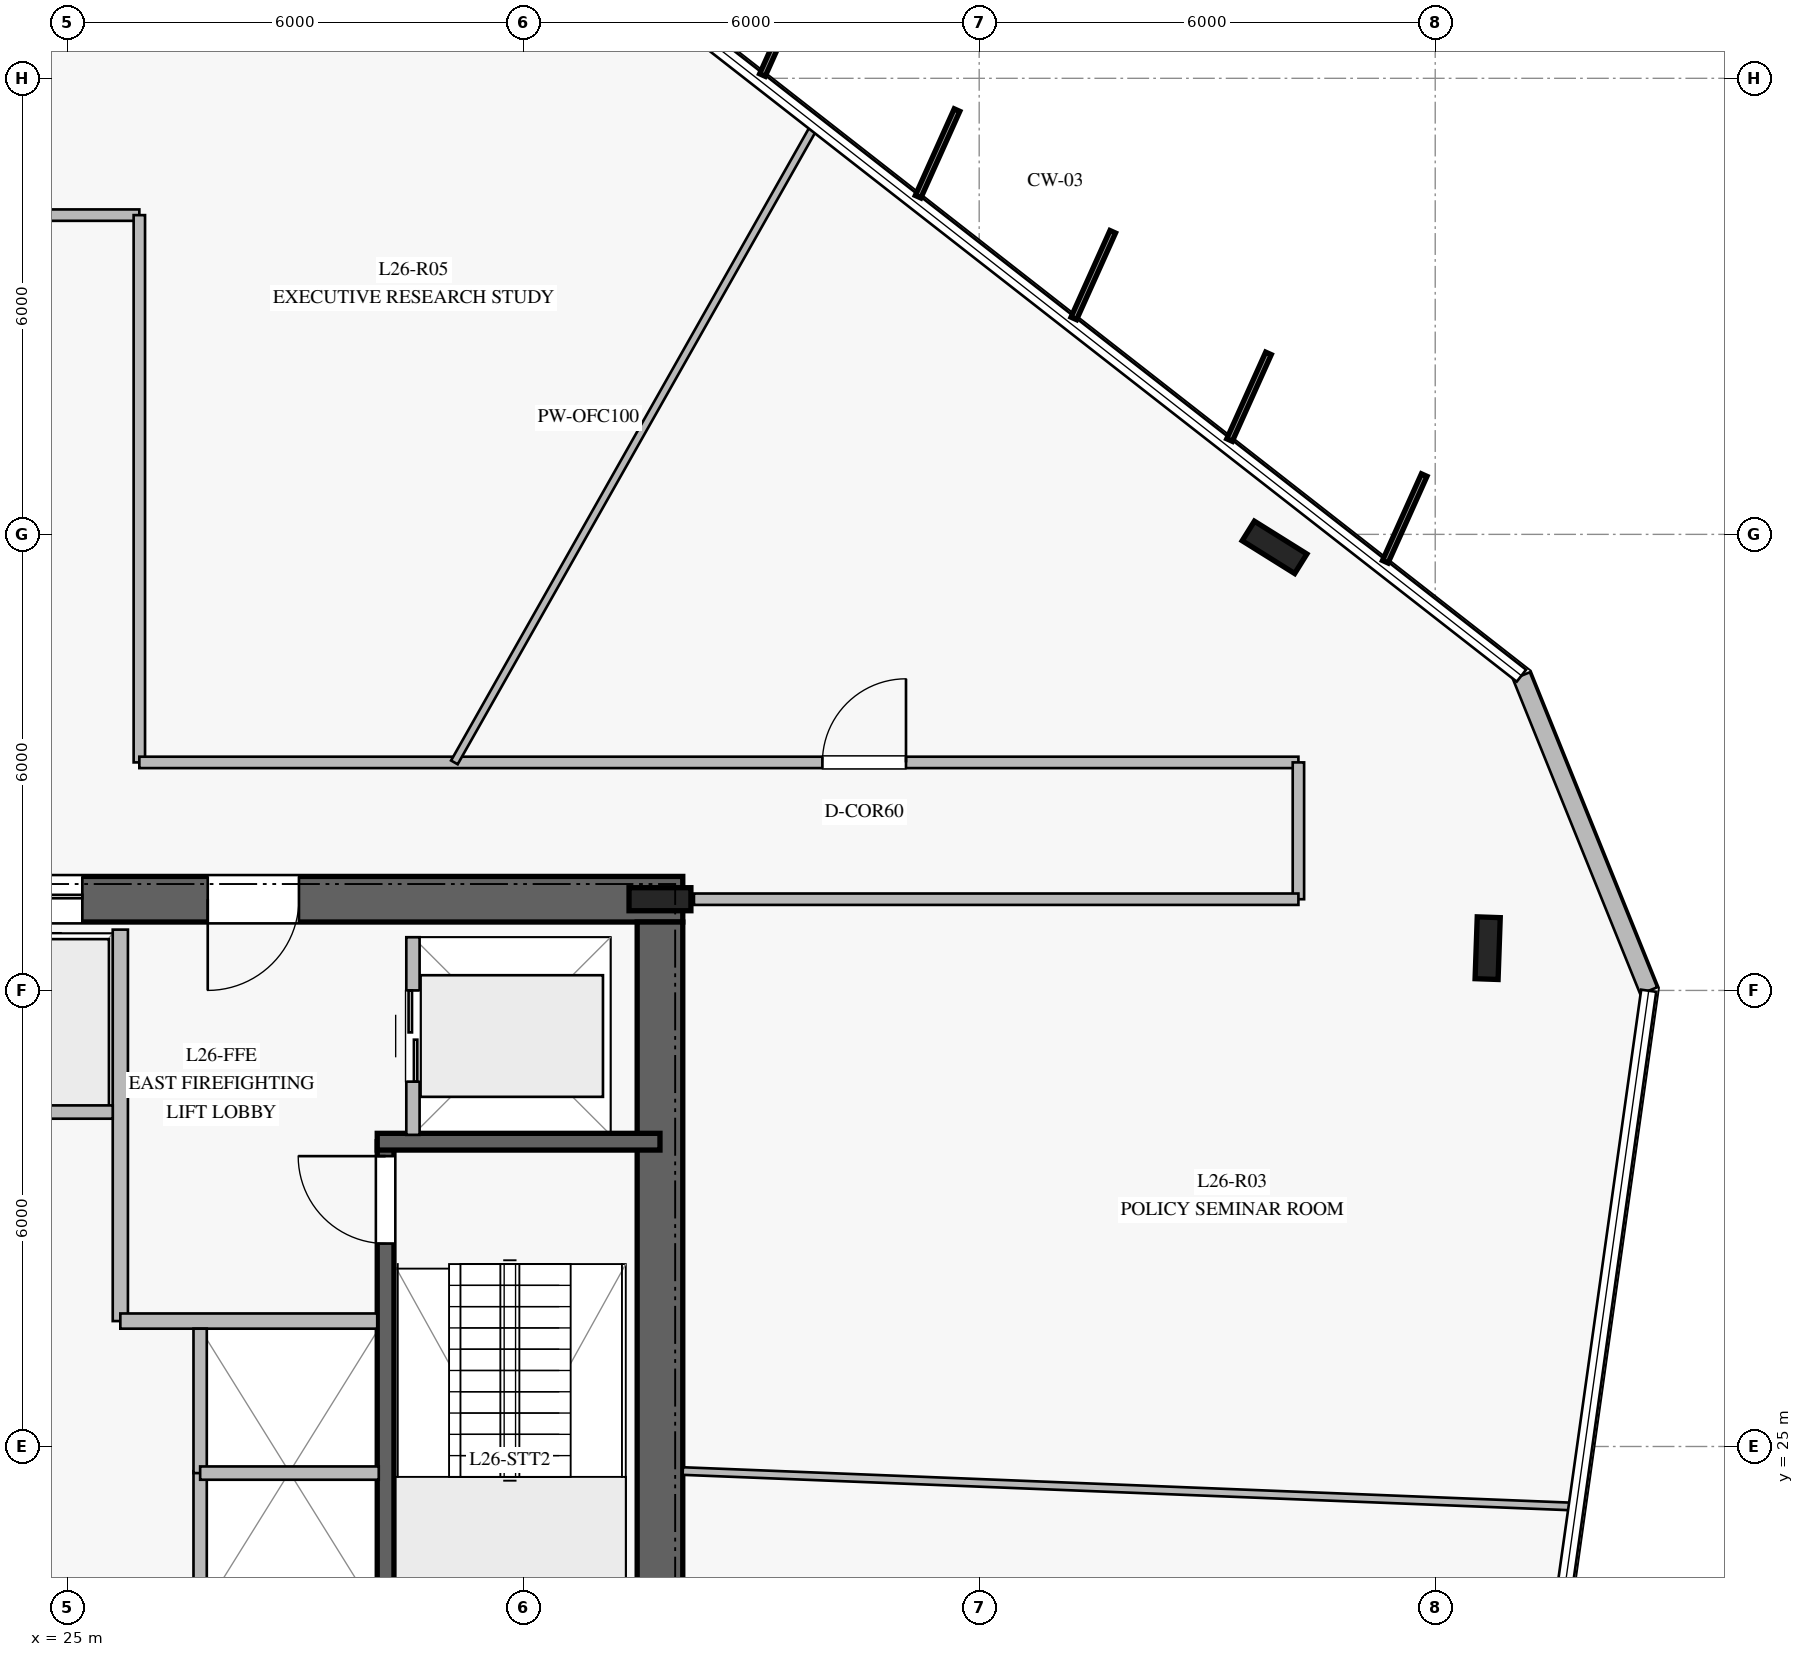
"""IFC4 building model, lengths in metres.
Left out: names, types, materials, properties, quantities, classifications, styles, units other than length and angle.
Written with IfcOpenShell. Run it as: python <this file> out.ifc"""

import sys

from ifc_helpers import new_model, si_unit, direction, frame, frame_2d, origin, origin_2d, place, context, subcontext, project, spatial, rectangle, i_section, extrude, element, fill, save


model = new_model("IFC4")
c1 = context("Model", 3, precision=1e-05, world=origin(), true_north=direction((0.0, 1.0)))
c2 = subcontext(c1, "Body", "Model", "MODEL_VIEW")
j1 = project(units=[si_unit("LENGTHUNIT", "METRE"), si_unit("PLANEANGLEUNIT", "RADIAN")], contexts=[c1])
p1 = place(None, origin())
s1 = spatial("IfcSite", under=j1, at=p1, CompositionType="ELEMENT")
p2 = place(p1, origin())
s2 = spatial("IfcBuilding", under=s1, at=p2, CompositionType="ELEMENT")
p3 = place(p2, frame((0.0, 0.0, 110.4)))
s3 = spatial("IfcBuildingStorey", under=s2, at=p3, CompositionType="ELEMENT", Elevation=110.4)
p4 = place(p3, frame((33.1, 32.2, 0.0), z_axis=(0.0, 0.0, 1.0), x_axis=(-1.0, 0.0, 0.0)))
e1 = element("IfcWall", 1, at=p4, inside=s3, PredefinedType="SHEAR", context=c2, shape_type="SweptSolid", body=[
    extrude(rectangle(XDim=16.2, YDim=0.6, at=frame_2d((8.1, 0.0))), origin(), (0.0, 0.0, 1.0), 3.76),
])
p5 = place(p4, frame((5.05, 0.0, 0.0)))
e2 = element("IfcOpeningElement", 2, at=p5, cuts=e1, PredefinedType="OPENING", context=c2, shape_type="SweptSolid", body=[
    extrude(rectangle(XDim=1.2, YDim=2.25, at=frame_2d((0.6, 1.125))), frame((0.0, 0.31, 0.0), z_axis=(0.0, -1.0, 0.0), x_axis=(1.0, 0.0, 0.0)), (0.0, 0.0, 1.0), 0.62),
])
p6 = place(p4, frame((11.85, 0.0, 0.0)))
e3 = element("IfcOpeningElement", 3, at=p6, cuts=e1, PredefinedType="OPENING", context=c2, shape_type="SweptSolid", body=[
    extrude(rectangle(XDim=1.1, YDim=2.2, at=frame_2d((0.55, 1.1))), frame((0.0, 0.31, 0.0), z_axis=(0.0, -1.0, 0.0), x_axis=(1.0, 0.0, 0.0)), (0.0, 0.0, 1.0), 0.62),
])
p7 = place(p4, frame((9.875, 0.0, 0.0)))
e4 = element("IfcOpeningElement", 4, at=p7, cuts=e1, PredefinedType="OPENING", context=c2, shape_type="SweptSolid", body=[
    extrude(rectangle(XDim=1.1, YDim=2.2, at=frame_2d((0.55, 1.1))), frame((0.0, 0.31, 0.0), z_axis=(0.0, -1.0, 0.0), x_axis=(1.0, 0.0, 0.0)), (0.0, 0.0, 1.0), 0.62),
])
p8 = place(p4, frame((7.9, 0.0, 0.0)))
e5 = element("IfcOpeningElement", 5, at=p8, cuts=e1, PredefinedType="OPENING", context=c2, shape_type="SweptSolid", body=[
    extrude(rectangle(XDim=1.1, YDim=2.2, at=frame_2d((0.55, 1.1))), frame((0.0, 0.31, 0.0), z_axis=(0.0, -1.0, 0.0), x_axis=(1.0, 0.0, 0.0)), (0.0, 0.0, 1.0), 0.62),
])
p9 = place(p3, frame((32.8, 18.1, 0.0), z_axis=(0.0, 0.0, 1.0), x_axis=(0.0, 1.0, 0.0)))
e6 = element("IfcWall", 6, at=p9, inside=s3, PredefinedType="SHEAR", context=c2, shape_type="SweptSolid", body=[
    extrude(rectangle(XDim=13.8, YDim=0.6, at=frame_2d((6.9, 0.0))), origin(), (0.0, 0.0, 1.0), 3.76),
])
p10 = place(p3, frame((32.8, 32.2, 0.0), z_axis=(0.0, 0.0, 1.0), x_axis=(1.0, 0.0, 0.0)))
e7 = element("IfcColumn", 7, at=p10, inside=s3, PredefinedType="COLUMN", context=c2, shape_type="SweptSolid", body=[
    extrude(i_section(OverallWidth=0.303, OverallDepth=0.814, WebThickness=0.021, FlangeThickness=0.04, at=origin_2d()), origin(), (0.0, 0.0, 1.0), 4.0),
])
p11 = place(p3, frame((29.19, 21.79, 0.0), z_axis=(0.0, 0.0, 1.0), x_axis=(0.0, 1.0, 0.0)))
e8 = element("IfcWall", 8, at=p11, inside=s3, PredefinedType="SOLIDWALL", context=c2, shape_type="SweptSolid", body=[
    extrude(rectangle(XDim=7.22, YDim=0.22, at=frame_2d((3.61, 0.0))), origin(), (0.0, 0.0, 1.0), 3.76),
])
p12 = place(p11, frame((5.88, 0.0, 0.0)))
e9 = element("IfcOpeningElement", 9, at=p12, cuts=e8, PredefinedType="OPENING", context=c2, shape_type="SweptSolid", body=[
    extrude(rectangle(XDim=1.15, YDim=2.2, at=frame_2d((0.575, 1.1))), frame((0.0, 0.12, 0.0), z_axis=(0.0, -1.0, 0.0), x_axis=(1.0, 0.0, 0.0)), (0.0, 0.0, 1.0), 0.24),
])
p13 = place(p3, frame((29.08, 29.01, 0.0), z_axis=(0.0, 0.0, 1.0), x_axis=(1.0, 0.0, 0.0)))
e10 = element("IfcWall", 10, at=p13, inside=s3, PredefinedType="SOLIDWALL", context=c2, shape_type="SweptSolid", body=[
    extrude(rectangle(XDim=3.72, YDim=0.22, at=frame_2d((1.86, 0.0))), origin(), (0.0, 0.0, 1.0), 3.76),
])
for number, where, z_axis, x_axis in (
    (11, (40.886, 36.829, 0.0), (0.0, 0.0, 1.0), (-0.848, 0.53, 0.0)),
    (12, (43.69, 31.556, 0.0), (0.0, 0.0, 1.0), (0.035, 0.999, 0.0)),
):
    element("IfcColumn", number, at=place(p3, frame(where, z_axis=z_axis, x_axis=x_axis)), inside=s3, PredefinedType="COLUMN", context=c2, shape_type="SweptSolid", body=[
        extrude(i_section(OverallWidth=0.303, OverallDepth=0.814, WebThickness=0.021, FlangeThickness=0.04, at=origin_2d()), origin(), (0.0, 0.0, 1.0), 4.0),
    ])
p14 = place(p3, frame((45.809, 30.996, 0.0), z_axis=(0.0, 0.0, 1.0), x_axis=(-0.374674323127, 0.927156487109, 0.0)))
e13 = element("IfcWall", 13, at=p14, inside=s3, PredefinedType="STANDARD", context=c2, shape_type="SweptSolid", body=[
    extrude(rectangle(XDim=4.471, YDim=0.24, at=frame_2d((2.235, 0.0))), origin(), (0.0, 0.0, 1.0), 3.76),
])
p15 = place(p3, frame((25.7, 26.65, 0.0), z_axis=(0.0, 0.0, 1.0), x_axis=(0.0, 1.0, 0.0)))
e14 = element("IfcWall", 14, at=p15, inside=s3, PredefinedType="PARTITIONING", context=c2, shape_type="SweptSolid", body=[
    extrude(rectangle(XDim=5.15, YDim=0.2, at=frame_2d((2.575, 0.0))), origin(), (0.0, 0.0, 1.0), 3.76),
])
p16 = place(p3, frame((25.7, 26.65, 0.0), z_axis=(0.0, 0.0, 1.0), x_axis=(1.0, 0.0, 0.0)))
e15 = element("IfcWall", 15, at=p16, inside=s3, PredefinedType="PARTITIONING", context=c2, shape_type="SweptSolid", body=[
    extrude(rectangle(XDim=3.38, YDim=0.2, at=frame_2d((1.69, 0.0))), origin(), (0.0, 0.0, 1.0), 3.76),
])
for number, where, z_axis, x_axis in (
    (16, (23.7, 29.4, 0.0), (0.0, 0.0, 1.0), (1.0, 0.0, 0.0)),
    (17, (26.75, 22.775, 0.0), (0.0, 0.0, 1.0), (0.0, 1.0, 0.0)),
    (18, (26.75, 24.65, 0.0), (0.0, 0.0, 1.0), (0.0, 1.0, 0.0)),
):
    element("IfcWall", number, at=place(p3, frame(where, z_axis=z_axis, x_axis=x_axis)), inside=s3, PredefinedType="PARTITIONING", context=c2, shape_type="SweptSolid", body=[
        extrude(rectangle(XDim=1.9, YDim=0.175, at=frame_2d((0.95, 0.0))), origin(), (0.0, 0.0, 1.0), 3.76),
    ])
p17 = place(p3, frame((26.75, 24.65, 0.0), z_axis=(0.0, 0.0, 1.0), x_axis=(1.0, 0.0, 0.0)))
e19 = element("IfcWall", 19, at=p17, inside=s3, PredefinedType="PARTITIONING", context=c2, shape_type="SweptSolid", body=[
    extrude(rectangle(XDim=2.35, YDim=0.175, at=frame_2d((1.175, 0.0))), origin(), (0.0, 0.0, 1.0), 3.76),
])
p18 = place(p3, frame((29.55, 29.1, 0.0), z_axis=(0.0, 0.0, 1.0), x_axis=(0.0, 1.0, 0.0)))
e20 = element("IfcWall", 20, at=p18, inside=s3, PredefinedType="PARTITIONING", context=c2, shape_type="SweptSolid", body=[
    extrude(rectangle(XDim=2.6, YDim=0.175, at=frame_2d((1.3, 0.0))), origin(), (0.0, 0.0, 1.0), 3.76),
])
p19 = place(p18, frame((0.7, 0.0, 0.0)))
e21 = element("IfcOpeningElement", 21, at=p19, cuts=e20, PredefinedType="OPENING", context=c2, shape_type="SweptSolid", body=[
    extrude(rectangle(XDim=1.2, YDim=2.2, at=frame_2d((0.6, 1.1))), frame((0.0, 0.098, 0.0), z_axis=(0.0, -1.0, 0.0), x_axis=(1.0, 0.0, 0.0)), (0.0, 0.0, 1.0), 0.195),
])
p20 = place(p3, frame((24.05, 41.2, 0.0), z_axis=(0.0, 0.0, 1.0), x_axis=(1.0, 0.0, 0.0)))
e22 = element("IfcWall", 22, at=p20, inside=s3, PredefinedType="PARTITIONING", context=c2, shape_type="SweptSolid", body=[
    extrude(rectangle(XDim=1.9, YDim=0.15, at=frame_2d((0.95, 0.0))), origin(), (0.0, 0.0, 1.0), 3.76),
])
p21 = place(p3, frame((25.95, 41.2, 0.0), z_axis=(0.0, 0.0, 1.0), x_axis=(0.0, -1.0, 0.0)))
e23 = element("IfcWall", 23, at=p21, inside=s3, PredefinedType="PARTITIONING", context=c2, shape_type="SweptSolid", body=[
    extrude(rectangle(XDim=7.2, YDim=0.15, at=frame_2d((3.6, 0.0))), origin(), (0.0, 0.0, 1.0), 3.36),
])
p22 = place(p3, frame((25.95, 34.0, 0.0), z_axis=(0.0, 0.0, 1.0), x_axis=(1.0, 0.0, 0.0)))
e24 = element("IfcWall", 24, at=p22, inside=s3, PredefinedType="PARTITIONING", context=c2, shape_type="SweptSolid", body=[
    extrude(rectangle(XDim=15.25, YDim=0.15, at=frame_2d((7.625, 0.0))), origin(), (0.0, 0.0, 1.0), 3.21),
])
p23 = place(p22, frame((8.987, 0.0, 0.0)))
e25 = element("IfcOpeningElement", 25, at=p23, cuts=e24, PredefinedType="OPENING", context=c2, shape_type="SweptSolid", body=[
    extrude(rectangle(XDim=1.1, YDim=2.2, at=frame_2d((0.55, 1.1))), frame((0.0, 0.085, 0.0), z_axis=(0.0, -1.0, 0.0), x_axis=(1.0, 0.0, 0.0)), (0.0, 0.0, 1.0), 0.17),
])
p24 = place(p3, frame((41.2, 34.0, 0.0), z_axis=(0.0, 0.0, 1.0), x_axis=(0.0, -1.0, 0.0)))
e26 = element("IfcWall", 26, at=p24, inside=s3, PredefinedType="PARTITIONING", context=c2, shape_type="SweptSolid", body=[
    extrude(rectangle(XDim=1.8, YDim=0.15, at=frame_2d((0.9, 0.0))), origin(), (0.0, 0.0, 1.0), 3.76),
])
p25 = place(p3, frame((41.2, 32.2, 0.0), z_axis=(0.0, 0.0, 1.0), x_axis=(-1.0, 0.0, 0.0)))
e27 = element("IfcWall", 27, at=p25, inside=s3, PredefinedType="PARTITIONING", context=c2, shape_type="SweptSolid", body=[
    extrude(rectangle(XDim=7.953, YDim=0.15, at=frame_2d((3.977, 0.0))), origin(), (0.0, 0.0, 1.0), 3.21),
])
p26 = place(p3, frame((30.095, 34.0, 0.0), z_axis=(0.0, 0.0, 1.0), x_axis=(0.492564171428, 0.870276126885, 0.0)))
e28 = element("IfcWall", 28, at=p26, inside=s3, PredefinedType="MOVABLE", context=c2, shape_type="SweptSolid", body=[
    extrude(rectangle(XDim=9.632, YDim=0.1, at=frame_2d((4.816, 0.0))), origin(), (0.0, 0.0, 1.0), 3.16),
])
p27 = place(p3, frame((33.1, 24.677, 0.0), z_axis=(0.0, 0.0, 1.0), x_axis=(0.999206030208, -0.039841049127, 0.0)))
e29 = element("IfcWall", 29, at=p27, inside=s3, PredefinedType="MOVABLE", context=c2, shape_type="SweptSolid", body=[
    extrude(rectangle(XDim=11.747, YDim=0.1, at=frame_2d((5.874, 0.0))), origin(), (0.0, 0.0, 1.0), 3.05),
])
p28 = place(p12, origin())
e30 = element("IfcDoor", 30, at=p28, inside=s3, OperationType="SINGLE_SWING_RIGHT", PredefinedType="DOOR", context=c2, shape_type="SweptSolid", body=[
    extrude(rectangle(XDim=1.15, YDim=2.2, at=frame_2d((0.575, 1.1))), frame((0.0, 0.025, 0.0), z_axis=(0.0, -1.0, 0.0), x_axis=(1.0, 0.0, 0.0)), (0.0, 0.0, 1.0), 0.05),
])
fill(e9, e30)
p29 = place(p5, origin())
e31 = element("IfcDoor", 31, at=p29, inside=s3, OperationType="SINGLE_SWING_RIGHT", PredefinedType="DOOR", context=c2, shape_type="SweptSolid", body=[
    extrude(rectangle(XDim=1.2, YDim=2.25, at=frame_2d((0.6, 1.125))), frame((0.0, 0.025, 0.0), z_axis=(0.0, -1.0, 0.0), x_axis=(1.0, 0.0, 0.0)), (0.0, 0.0, 1.0), 0.05),
])
fill(e2, e31)
p30 = place(p8, origin())
e32 = element("IfcDoor", 32, at=p30, inside=s3, OperationType="DOUBLE_DOOR_SLIDING", PredefinedType="DOOR", context=c2, shape_type="SweptSolid", body=[
    extrude(rectangle(XDim=1.1, YDim=2.2, at=frame_2d((0.55, 1.1))), frame((0.0, 0.025, 0.0), z_axis=(0.0, -1.0, 0.0), x_axis=(1.0, 0.0, 0.0)), (0.0, 0.0, 1.0), 0.05),
])
fill(e5, e32)
p31 = place(p19, origin())
e33 = element("IfcDoor", 33, at=p31, inside=s3, OperationType="DOUBLE_DOOR_SLIDING", PredefinedType="DOOR", context=c2, shape_type="SweptSolid", body=[
    extrude(rectangle(XDim=1.2, YDim=2.2, at=frame_2d((0.6, 1.1))), frame((0.0, 0.025, 0.0), z_axis=(0.0, -1.0, 0.0), x_axis=(1.0, 0.0, 0.0)), (0.0, 0.0, 1.0), 0.05),
])
fill(e21, e33)
p32 = place(p23, origin())
e34 = element("IfcDoor", 34, at=p32, inside=s3, OperationType="SINGLE_SWING_RIGHT", PredefinedType="DOOR", context=c2, shape_type="SweptSolid", body=[
    extrude(rectangle(XDim=1.1, YDim=2.2, at=frame_2d((0.55, 1.1))), frame((0.0, 0.025, 0.0), z_axis=(0.0, -1.0, 0.0), x_axis=(1.0, 0.0, 0.0)), (0.0, 0.0, 1.0), 0.05),
])
fill(e25, e34)
save(model, sys.argv[1])
